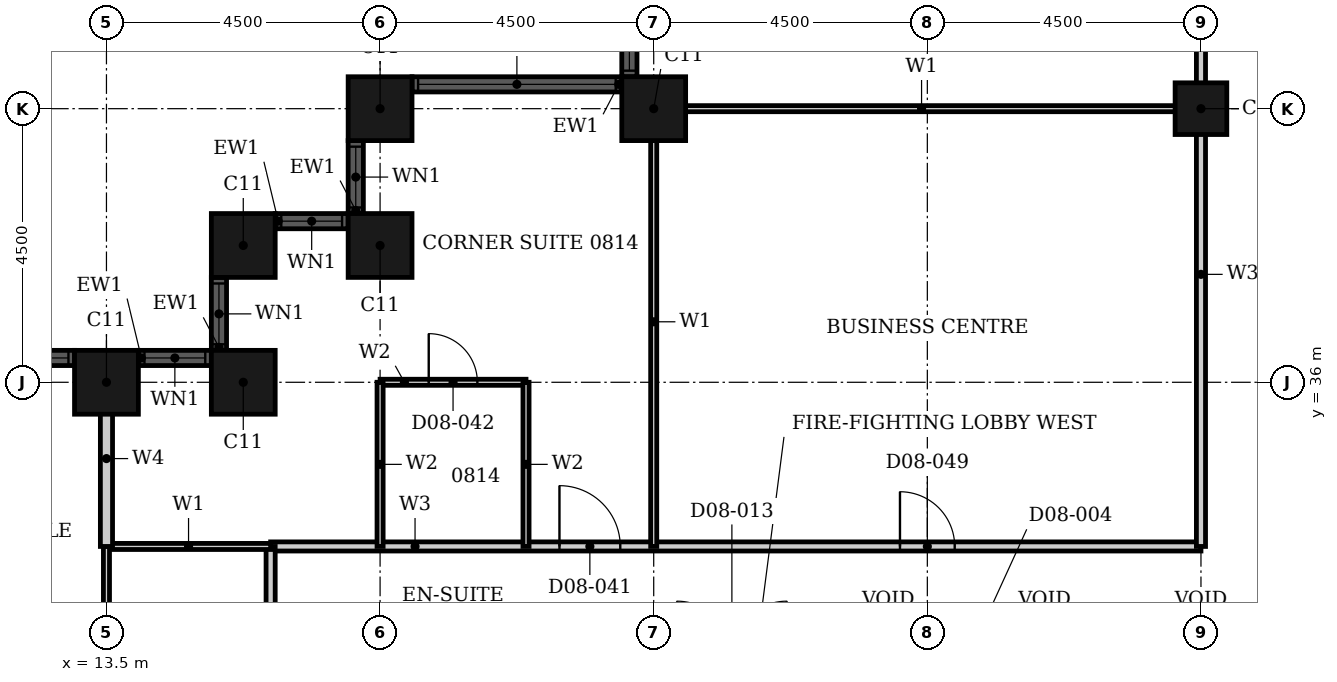
"""IFC4 building model, lengths in metres.
Left out: names, types, materials, properties, quantities, classifications, styles, units other than length and angle.
Written with IfcOpenShell. Run it as: python <this file> out.ifc"""

import sys

from ifc_helpers import new_model, si_unit, direction, frame, frame_2d, origin, origin_2d, place, context, subcontext, project, spatial, rectangle, hollow_rectangle, extrude, element, fill, save


model = new_model("IFC4")
c1 = context("Model", 3, precision=1e-05, world=origin(), true_north=direction((0.0, 1.0)))
c2 = subcontext(c1, "Body", "Model", "MODEL_VIEW")
j1 = project(units=[si_unit("LENGTHUNIT", "METRE"), si_unit("PLANEANGLEUNIT", "RADIAN")], contexts=[c1])
p1 = place(None, origin())
s1 = spatial("IfcSite", under=j1, at=p1, CompositionType="ELEMENT")
p2 = place(p1, origin())
s2 = spatial("IfcBuilding", under=s1, at=p2, CompositionType="ELEMENT")
p3 = place(p2, frame((0.0, 0.0, 40.8)))
s3 = spatial("IfcBuildingStorey", under=s2, at=p3, CompositionType="ELEMENT", Elevation=40.8)
for number, where, z_axis, x_axis in (
    (1, (22.5, 40.5, 0.0), (0.0, 0.0, 1.0), (1.0, 0.0, 0.0)),
    (2, (18.0, 40.5, 0.0), (0.0, 0.0, 1.0), (1.0, 0.0, 0.0)),
    (3, (18.0, 38.25, 0.0), (0.0, 0.0, 1.0), (1.0, 0.0, 0.0)),
    (4, (15.75, 38.25, 0.0), (0.0, 0.0, 1.0), (1.0, 0.0, 0.0)),
    (5, (15.75, 36.0, 0.0), (0.0, 0.0, 1.0), (1.0, 0.0, 0.0)),
    (6, (13.5, 36.0, 0.0), (0.0, 0.0, 1.0), (1.0, 0.0, 0.0)),
):
    element("IfcColumn", number, at=place(p3, frame(where, z_axis=z_axis, x_axis=x_axis)), inside=s3, PredefinedType="COLUMN", context=c2, shape_type="SweptSolid", body=[
        extrude(hollow_rectangle(XDim=1.05, YDim=1.05, WallThickness=0.034, at=origin_2d()), origin(), (0.0, 0.0, 1.0), 3.6),
    ])
p4 = place(p3, frame((31.5, 40.5, 0.0), z_axis=(0.0, 0.0, 1.0), x_axis=(1.0, 0.0, 0.0)))
e7 = element("IfcColumn", 7, at=p4, inside=s3, PredefinedType="COLUMN", context=c2, shape_type="SweptSolid", body=[
    extrude(hollow_rectangle(XDim=0.85, YDim=0.85, WallThickness=0.026, at=origin_2d()), origin(), (0.0, 0.0, 1.0), 3.6),
])
p5 = place(p3, frame((22.1, 48.975, 0.0), z_axis=(0.0, 0.0, 1.0), x_axis=(0.0, -1.0, 0.0)))
e8 = element("IfcWall", 8, at=p5, inside=s3, PredefinedType="SOLIDWALL", context=c2, shape_type="SweptSolid", body=[
    extrude(rectangle(XDim=7.95, YDim=0.25, at=frame_2d((3.975, 0.0))), origin(), (0.0, 0.0, 1.0), 3.6),
])
p6 = place(p5, frame((0.1, 0.0, 0.9)))
e9 = element("IfcOpeningElement", 9, at=p6, cuts=e8, PredefinedType="OPENING", context=c2, shape_type="SweptSolid", body=[
    extrude(rectangle(XDim=3.25, YDim=2.08, at=frame_2d((1.625, 1.04))), frame((0.0, 0.135, 0.0), z_axis=(0.0, -1.0, 0.0), x_axis=(1.0, 0.0, 0.0)), (0.0, 0.0, 1.0), 0.27),
])
p7 = place(p5, frame((4.6, 0.0, 0.9)))
e10 = element("IfcOpeningElement", 10, at=p7, cuts=e8, PredefinedType="OPENING", context=c2, shape_type="SweptSolid", body=[
    extrude(rectangle(XDim=3.25, YDim=2.08, at=frame_2d((1.625, 1.04))), frame((0.0, 0.135, 0.0), z_axis=(0.0, -1.0, 0.0), x_axis=(1.0, 0.0, 0.0)), (0.0, 0.0, 1.0), 0.27),
])
p8 = place(p3, frame((21.975, 40.9, 0.0), z_axis=(0.0, 0.0, 1.0), x_axis=(-1.0, 0.0, 0.0)))
e11 = element("IfcWall", 11, at=p8, inside=s3, PredefinedType="SOLIDWALL", context=c2, shape_type="SweptSolid", body=[
    extrude(rectangle(XDim=3.45, YDim=0.25, at=frame_2d((1.725, 0.0))), origin(), (0.0, 0.0, 1.0), 3.6),
])
p9 = place(p8, frame((0.1, 0.0, 0.9)))
e12 = element("IfcOpeningElement", 12, at=p9, cuts=e11, PredefinedType="OPENING", context=c2, shape_type="SweptSolid", body=[
    extrude(rectangle(XDim=3.25, YDim=2.08, at=frame_2d((1.625, 1.04))), frame((0.0, 0.135, 0.0), z_axis=(0.0, -1.0, 0.0), x_axis=(1.0, 0.0, 0.0)), (0.0, 0.0, 1.0), 0.27),
])
p10 = place(p3, frame((17.6, 39.975, 0.0), z_axis=(0.0, 0.0, 1.0), x_axis=(0.0, -1.0, 0.0)))
e13 = element("IfcWall", 13, at=p10, inside=s3, PredefinedType="SOLIDWALL", context=c2, shape_type="SweptSolid", body=[
    extrude(rectangle(XDim=1.2, YDim=0.25, at=frame_2d((0.6, 0.0))), origin(), (0.0, 0.0, 1.0), 3.6),
])
p11 = place(p10, frame((0.1, 0.0, 0.9)))
e14 = element("IfcOpeningElement", 14, at=p11, cuts=e13, PredefinedType="OPENING", context=c2, shape_type="SweptSolid", body=[
    extrude(rectangle(XDim=1.0, YDim=2.08, at=frame_2d((0.5, 1.04))), frame((0.0, 0.135, 0.0), z_axis=(0.0, -1.0, 0.0), x_axis=(1.0, 0.0, 0.0)), (0.0, 0.0, 1.0), 0.27),
])
p12 = place(p3, frame((17.475, 38.65, 0.0), z_axis=(0.0, 0.0, 1.0), x_axis=(-1.0, 0.0, 0.0)))
e15 = element("IfcWall", 15, at=p12, inside=s3, PredefinedType="SOLIDWALL", context=c2, shape_type="SweptSolid", body=[
    extrude(rectangle(XDim=1.2, YDim=0.25, at=frame_2d((0.6, 0.0))), origin(), (0.0, 0.0, 1.0), 3.6),
])
p13 = place(p12, frame((0.1, 0.0, 0.9)))
e16 = element("IfcOpeningElement", 16, at=p13, cuts=e15, PredefinedType="OPENING", context=c2, shape_type="SweptSolid", body=[
    extrude(rectangle(XDim=1.0, YDim=2.08, at=frame_2d((0.5, 1.04))), frame((0.0, 0.135, 0.0), z_axis=(0.0, -1.0, 0.0), x_axis=(1.0, 0.0, 0.0)), (0.0, 0.0, 1.0), 0.27),
])
p14 = place(p3, frame((15.35, 37.725, 0.0), z_axis=(0.0, 0.0, 1.0), x_axis=(0.0, -1.0, 0.0)))
e17 = element("IfcWall", 17, at=p14, inside=s3, PredefinedType="SOLIDWALL", context=c2, shape_type="SweptSolid", body=[
    extrude(rectangle(XDim=1.2, YDim=0.25, at=frame_2d((0.6, 0.0))), origin(), (0.0, 0.0, 1.0), 3.6),
])
p15 = place(p14, frame((0.1, 0.0, 0.9)))
e18 = element("IfcOpeningElement", 18, at=p15, cuts=e17, PredefinedType="OPENING", context=c2, shape_type="SweptSolid", body=[
    extrude(rectangle(XDim=1.0, YDim=2.08, at=frame_2d((0.5, 1.04))), frame((0.0, 0.135, 0.0), z_axis=(0.0, -1.0, 0.0), x_axis=(1.0, 0.0, 0.0)), (0.0, 0.0, 1.0), 0.27),
])
p16 = place(p3, frame((15.225, 36.4, 0.0), z_axis=(0.0, 0.0, 1.0), x_axis=(-1.0, 0.0, 0.0)))
e19 = element("IfcWall", 19, at=p16, inside=s3, PredefinedType="SOLIDWALL", context=c2, shape_type="SweptSolid", body=[
    extrude(rectangle(XDim=1.2, YDim=0.25, at=frame_2d((0.6, 0.0))), origin(), (0.0, 0.0, 1.0), 3.6),
])
p17 = place(p16, frame((0.1, 0.0, 0.9)))
e20 = element("IfcOpeningElement", 20, at=p17, cuts=e19, PredefinedType="OPENING", context=c2, shape_type="SweptSolid", body=[
    extrude(rectangle(XDim=1.0, YDim=2.08, at=frame_2d((0.5, 1.04))), frame((0.0, 0.135, 0.0), z_axis=(0.0, -1.0, 0.0), x_axis=(1.0, 0.0, 0.0)), (0.0, 0.0, 1.0), 0.27),
])
p18 = place(p3, frame((12.975, 36.4, 0.0), z_axis=(0.0, 0.0, 1.0), x_axis=(-1.0, 0.0, 0.0)))
e21 = element("IfcWall", 21, at=p18, inside=s3, PredefinedType="SOLIDWALL", context=c2, shape_type="SweptSolid", body=[
    extrude(rectangle(XDim=7.95, YDim=0.25, at=frame_2d((3.975, 0.0))), origin(), (0.0, 0.0, 1.0), 3.6),
])
p19 = place(p18, frame((0.1, 0.0, 0.9)))
e22 = element("IfcOpeningElement", 22, at=p19, cuts=e21, PredefinedType="OPENING", context=c2, shape_type="SweptSolid", body=[
    extrude(rectangle(XDim=3.25, YDim=2.08, at=frame_2d((1.625, 1.04))), frame((0.0, 0.135, 0.0), z_axis=(0.0, -1.0, 0.0), x_axis=(1.0, 0.0, 0.0)), (0.0, 0.0, 1.0), 0.27),
])
p20 = place(p18, frame((4.6, 0.0, 0.9)))
e23 = element("IfcOpeningElement", 23, at=p20, cuts=e21, PredefinedType="OPENING", context=c2, shape_type="SweptSolid", body=[
    extrude(rectangle(XDim=3.25, YDim=2.08, at=frame_2d((1.625, 1.04))), frame((0.0, 0.135, 0.0), z_axis=(0.0, -1.0, 0.0), x_axis=(1.0, 0.0, 0.0)), (0.0, 0.0, 1.0), 0.27),
])
p21 = place(p3, frame((16.2, 33.3, 0.0), z_axis=(0.0, 0.0, 1.0), x_axis=(1.0, 0.0, 0.0)))
e24 = element("IfcWall", 24, at=p21, inside=s3, PredefinedType="PARTITIONING", context=c2, shape_type="SweptSolid", body=[
    extrude(rectangle(XDim=15.3, YDim=0.15, at=frame_2d((7.65, 0.0))), origin(), (0.0, 0.0, 1.0), 3.3),
])
p22 = place(p21, frame((4.75, 0.0, 0.0)))
e25 = element("IfcOpeningElement", 25, at=p22, cuts=e24, PredefinedType="OPENING", context=c2, shape_type="SweptSolid", body=[
    extrude(rectangle(XDim=1.0, YDim=2.1, at=frame_2d((0.5, 1.05))), frame((0.0, 0.085, 0.0), z_axis=(0.0, -1.0, 0.0), x_axis=(1.0, 0.0, 0.0)), (0.0, 0.0, 1.0), 0.17),
])
p23 = place(p21, frame((10.35, 0.0, 0.0)))
e26 = element("IfcOpeningElement", 26, at=p23, cuts=e24, PredefinedType="OPENING", context=c2, shape_type="SweptSolid", body=[
    extrude(rectangle(XDim=0.9, YDim=2.1, at=frame_2d((0.45, 1.05))), frame((0.0, 0.085, 0.0), z_axis=(0.0, -1.0, 0.0), x_axis=(1.0, 0.0, 0.0)), (0.0, 0.0, 1.0), 0.17),
])
p24 = place(p3, frame((16.2, 27.0, 0.0), z_axis=(0.0, 0.0, 1.0), x_axis=(0.0, 1.0, 0.0)))
e27 = element("IfcWall", 27, at=p24, inside=s3, PredefinedType="PARTITIONING", context=c2, shape_type="SweptSolid", body=[
    extrude(rectangle(XDim=6.3, YDim=0.15, at=frame_2d((3.15, 0.0))), origin(), (0.0, 0.0, 1.0), 3.3),
])
p25 = place(p24, frame((2.525, 0.0, 0.0)))
e28 = element("IfcOpeningElement", 28, at=p25, cuts=e27, PredefinedType="OPENING", context=c2, shape_type="SweptSolid", body=[
    extrude(rectangle(XDim=0.95, YDim=2.1, at=frame_2d((0.475, 1.05))), frame((0.0, 0.085, 0.0), z_axis=(0.0, -1.0, 0.0), x_axis=(1.0, 0.0, 0.0)), (0.0, 0.0, 1.0), 0.17),
])
p26 = place(p3, frame((31.5, 33.3, 0.0), z_axis=(0.0, 0.0, 1.0), x_axis=(0.0, 1.0, 0.0)))
e29 = element("IfcWall", 29, at=p26, inside=s3, PredefinedType="PARTITIONING", context=c2, shape_type="SweptSolid", body=[
    extrude(rectangle(XDim=16.2, YDim=0.15, at=frame_2d((8.1, 0.0))), origin(), (0.0, 0.0, 1.0), 2.58),
])
p27 = place(p26, frame((8.95, 0.0, 0.0)))
e30 = element("IfcOpeningElement", 30, at=p27, cuts=e29, PredefinedType="OPENING", context=c2, shape_type="SweptSolid", body=[
    extrude(rectangle(XDim=1.0, YDim=2.1, at=frame_2d((0.5, 1.05))), frame((0.0, 0.085, 0.0), z_axis=(0.0, -1.0, 0.0), x_axis=(1.0, 0.0, 0.0)), (0.0, 0.0, 1.0), 0.17),
])
p28 = place(p3, frame((13.5, 33.3, 0.0), z_axis=(0.0, 0.0, 1.0), x_axis=(1.0, 0.0, 0.0)))
e31 = element("IfcWall", 31, at=p28, inside=s3, PredefinedType="PARTITIONING", context=c2, shape_type="SweptSolid", body=[
    extrude(rectangle(XDim=2.7, YDim=0.1, at=frame_2d((1.35, 0.0))), origin(), (0.0, 0.0, 1.0), 3.3),
])
p29 = place(p3, frame((22.31, 40.5, 0.0), z_axis=(0.0, 0.0, 1.0), x_axis=(1.0, 0.0, 0.0)))
e32 = element("IfcWall", 32, at=p29, inside=s3, PredefinedType="PARTITIONING", context=c2, shape_type="SweptSolid", body=[
    extrude(rectangle(XDim=9.19, YDim=0.1, at=frame_2d((4.595, 0.0))), origin(), (0.0, 0.0, 1.0), 2.38),
])
p30 = place(p3, frame((13.5, 27.0, 0.0), z_axis=(0.0, 0.0, 1.0), x_axis=(0.0, 1.0, 0.0)))
e33 = element("IfcWall", 33, at=p30, inside=s3, PredefinedType="PARTITIONING", context=c2, shape_type="SweptSolid", body=[
    extrude(rectangle(XDim=6.3, YDim=0.1, at=frame_2d((3.15, 0.0))), origin(), (0.0, 0.0, 1.0), 2.38),
])
p31 = place(p3, frame((22.5, 33.3, 0.0), z_axis=(0.0, 0.0, 1.0), x_axis=(0.0, 1.0, 0.0)))
e34 = element("IfcWall", 34, at=p31, inside=s3, PredefinedType="PARTITIONING", context=c2, shape_type="SweptSolid", body=[
    extrude(rectangle(XDim=7.39, YDim=0.1, at=frame_2d((3.695, 0.0))), origin(), (0.0, 0.0, 1.0), 3.3),
])
p32 = place(p3, frame((13.5, 33.3, 0.0), z_axis=(0.0, 0.0, 1.0), x_axis=(0.0, 1.0, 0.0)))
e35 = element("IfcWall", 35, at=p32, inside=s3, PredefinedType="PARTITIONING", context=c2, shape_type="SweptSolid", body=[
    extrude(rectangle(XDim=2.89, YDim=0.2, at=frame_2d((1.445, 0.0))), origin(), (0.0, 0.0, 1.0), 2.38),
])
p33 = place(p3, frame((18.0, 36.0, 0.0), z_axis=(0.0, 0.0, 1.0), x_axis=(1.0, 0.0, 0.0)))
e36 = element("IfcWall", 36, at=p33, inside=s3, PredefinedType="PARTITIONING", context=c2, shape_type="SweptSolid", body=[
    extrude(rectangle(XDim=2.4, YDim=0.1, at=frame_2d((1.2, 0.0))), origin(), (0.0, 0.0, 1.0), 3.3),
])
p34 = place(p33, frame((0.8, 0.0, 0.0)))
e37 = element("IfcOpeningElement", 37, at=p34, cuts=e36, PredefinedType="OPENING", context=c2, shape_type="SweptSolid", body=[
    extrude(rectangle(XDim=0.8, YDim=2.1, at=frame_2d((0.4, 1.05))), frame((0.0, 0.06, 0.0), z_axis=(0.0, -1.0, 0.0), x_axis=(1.0, 0.0, 0.0)), (0.0, 0.0, 1.0), 0.12),
])
for number, where, z_axis, x_axis in (
    (38, (18.0, 33.3, 0.0), (0.0, 0.0, 1.0), (0.0, 1.0, 0.0)),
    (39, (20.4, 33.3, 0.0), (0.0, 0.0, 1.0), (0.0, 1.0, 0.0)),
):
    element("IfcWall", number, at=place(p3, frame(where, z_axis=z_axis, x_axis=x_axis)), inside=s3, PredefinedType="PARTITIONING", context=c2, shape_type="SweptSolid", body=[
        extrude(rectangle(XDim=2.7, YDim=0.1, at=frame_2d((1.35, 0.0))), origin(), (0.0, 0.0, 1.0), 3.3),
    ])
p35 = place(p7, origin())
e40 = element("IfcWindow", 40, at=p35, inside=s3, PartitioningType="SINGLE_PANEL", PredefinedType="WINDOW", context=c2, shape_type="SweptSolid", body=[
    extrude(rectangle(XDim=3.25, YDim=2.08, at=frame_2d((1.625, 1.04))), frame((0.0, 0.03, 0.0), z_axis=(0.0, -1.0, 0.0), x_axis=(1.0, 0.0, 0.0)), (0.0, 0.0, 1.0), 0.06),
])
fill(e10, e40)
p36 = place(p9, origin())
e41 = element("IfcWindow", 41, at=p36, inside=s3, PartitioningType="SINGLE_PANEL", PredefinedType="WINDOW", context=c2, shape_type="SweptSolid", body=[
    extrude(rectangle(XDim=3.25, YDim=2.08, at=frame_2d((1.625, 1.04))), frame((0.0, 0.03, 0.0), z_axis=(0.0, -1.0, 0.0), x_axis=(1.0, 0.0, 0.0)), (0.0, 0.0, 1.0), 0.06),
])
fill(e12, e41)
p37 = place(p11, origin())
e42 = element("IfcWindow", 42, at=p37, inside=s3, PartitioningType="SINGLE_PANEL", PredefinedType="WINDOW", context=c2, shape_type="SweptSolid", body=[
    extrude(rectangle(XDim=1.0, YDim=2.08, at=frame_2d((0.5, 1.04))), frame((0.0, 0.03, 0.0), z_axis=(0.0, -1.0, 0.0), x_axis=(1.0, 0.0, 0.0)), (0.0, 0.0, 1.0), 0.06),
])
fill(e14, e42)
p38 = place(p13, origin())
e43 = element("IfcWindow", 43, at=p38, inside=s3, PartitioningType="SINGLE_PANEL", PredefinedType="WINDOW", context=c2, shape_type="SweptSolid", body=[
    extrude(rectangle(XDim=1.0, YDim=2.08, at=frame_2d((0.5, 1.04))), frame((0.0, 0.03, 0.0), z_axis=(0.0, -1.0, 0.0), x_axis=(1.0, 0.0, 0.0)), (0.0, 0.0, 1.0), 0.06),
])
fill(e16, e43)
p39 = place(p15, origin())
e44 = element("IfcWindow", 44, at=p39, inside=s3, PartitioningType="SINGLE_PANEL", PredefinedType="WINDOW", context=c2, shape_type="SweptSolid", body=[
    extrude(rectangle(XDim=1.0, YDim=2.08, at=frame_2d((0.5, 1.04))), frame((0.0, 0.03, 0.0), z_axis=(0.0, -1.0, 0.0), x_axis=(1.0, 0.0, 0.0)), (0.0, 0.0, 1.0), 0.06),
])
fill(e18, e44)
p40 = place(p17, origin())
e45 = element("IfcWindow", 45, at=p40, inside=s3, PartitioningType="SINGLE_PANEL", PredefinedType="WINDOW", context=c2, shape_type="SweptSolid", body=[
    extrude(rectangle(XDim=1.0, YDim=2.08, at=frame_2d((0.5, 1.04))), frame((0.0, 0.03, 0.0), z_axis=(0.0, -1.0, 0.0), x_axis=(1.0, 0.0, 0.0)), (0.0, 0.0, 1.0), 0.06),
])
fill(e20, e45)
p41 = place(p19, origin())
e46 = element("IfcWindow", 46, at=p41, inside=s3, PartitioningType="SINGLE_PANEL", PredefinedType="WINDOW", context=c2, shape_type="SweptSolid", body=[
    extrude(rectangle(XDim=3.25, YDim=2.08, at=frame_2d((1.625, 1.04))), frame((0.0, 0.03, 0.0), z_axis=(0.0, -1.0, 0.0), x_axis=(1.0, 0.0, 0.0)), (0.0, 0.0, 1.0), 0.06),
])
fill(e22, e46)
p42 = place(p22, origin())
e47 = element("IfcDoor", 47, at=p42, inside=s3, OperationType="SINGLE_SWING_RIGHT", PredefinedType="DOOR", context=c2, shape_type="SweptSolid", body=[
    extrude(rectangle(XDim=1.0, YDim=2.1, at=frame_2d((0.5, 1.05))), frame((0.0, 0.025, 0.0), z_axis=(0.0, -1.0, 0.0), x_axis=(1.0, 0.0, 0.0)), (0.0, 0.0, 1.0), 0.05),
])
fill(e25, e47)
p43 = place(p34, origin())
e48 = element("IfcDoor", 48, at=p43, inside=s3, OperationType="SINGLE_SWING_RIGHT", PredefinedType="DOOR", context=c2, shape_type="SweptSolid", body=[
    extrude(rectangle(XDim=0.8, YDim=2.1, at=frame_2d((0.4, 1.05))), frame((0.0, 0.025, 0.0), z_axis=(0.0, -1.0, 0.0), x_axis=(1.0, 0.0, 0.0)), (0.0, 0.0, 1.0), 0.05),
])
fill(e37, e48)
p44 = place(p23, origin())
e49 = element("IfcDoor", 49, at=p44, inside=s3, OperationType="SINGLE_SWING_RIGHT", PredefinedType="DOOR", context=c2, shape_type="SweptSolid", body=[
    extrude(rectangle(XDim=0.9, YDim=2.1, at=frame_2d((0.45, 1.05))), frame((0.0, 0.025, 0.0), z_axis=(0.0, -1.0, 0.0), x_axis=(1.0, 0.0, 0.0)), (0.0, 0.0, 1.0), 0.05),
])
fill(e26, e49)
save(model, sys.argv[1])
